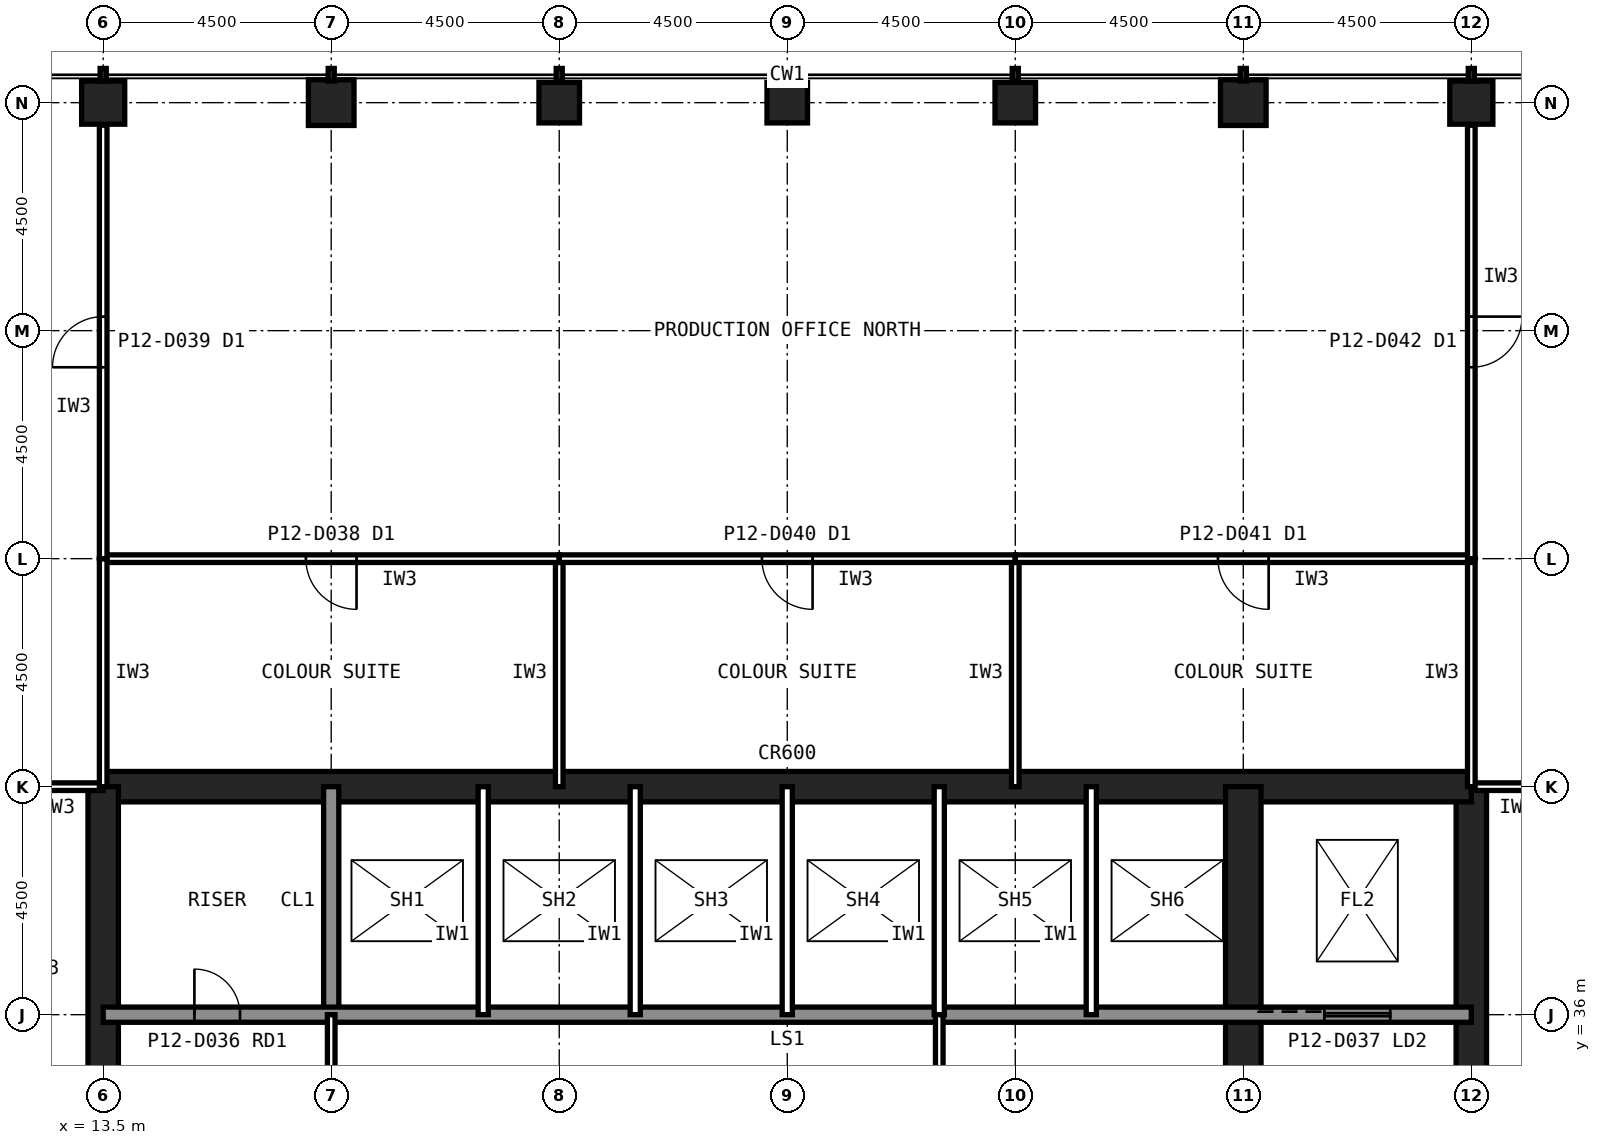
"""IFC4 building model, lengths in metres.
Left out: names, types, materials, properties, quantities, classifications, styles, units other than length and angle.
Written with IfcOpenShell. Run it as: python <this file> out.ifc"""

import sys

from ifc_helpers import new_model, si_unit, direction, frame, frame_2d, origin, origin_2d, place, context, subcontext, project, spatial, rectangle, hollow_rectangle, extrude, element, fill, save


model = new_model("IFC4")
c1 = context("Model", 3, precision=1e-05, world=origin(), true_north=direction((0.0, 1.0)))
c2 = subcontext(c1, "Body", "Model", "MODEL_VIEW")
j1 = project(units=[si_unit("LENGTHUNIT", "METRE"), si_unit("PLANEANGLEUNIT", "RADIAN")], contexts=[c1])
p1 = place(None, origin())
s1 = spatial("IfcSite", under=j1, at=p1, CompositionType="ELEMENT")
p2 = place(p1, origin())
s2 = spatial("IfcBuilding", under=s1, at=p2, CompositionType="ELEMENT")
p3 = place(p2, frame((0.0, 0.0, 54.2)))
s3 = spatial("IfcBuildingStorey", under=s2, at=p3, CompositionType="ELEMENT", Elevation=54.2)
p4 = place(p3, frame((40.5, 54.0, 0.0), z_axis=(0.0, 0.0, 1.0), x_axis=(1.0, 0.0, 0.0)))
e1 = element("IfcColumn", 1, at=p4, inside=s3, PredefinedType="COLUMN", context=c2, shape_type="SweptSolid", body=[
    extrude(hollow_rectangle(XDim=0.85, YDim=0.85, WallThickness=0.05, at=origin_2d()), origin(), (0.0, 0.0, 1.0), 4.2),
])
p5 = place(p3, frame((36.0, 54.0, 0.0), z_axis=(0.0, 0.0, 1.0), x_axis=(1.0, 0.0, 0.0)))
e2 = element("IfcColumn", 2, at=p5, inside=s3, PredefinedType="COLUMN", context=c2, shape_type="SweptSolid", body=[
    extrude(hollow_rectangle(XDim=0.9, YDim=0.9, WallThickness=0.063, at=origin_2d()), origin(), (0.0, 0.0, 1.0), 4.2),
])
for number, where, z_axis, x_axis in (
    (3, (31.5, 54.0, 0.0), (0.0, 0.0, 1.0), (1.0, 0.0, 0.0)),
    (4, (27.0, 54.0, 0.0), (0.0, 0.0, 1.0), (1.0, 0.0, 0.0)),
    (5, (22.5, 54.0, 0.0), (0.0, 0.0, 1.0), (1.0, 0.0, 0.0)),
):
    element("IfcColumn", number, at=place(p3, frame(where, z_axis=z_axis, x_axis=x_axis)), inside=s3, PredefinedType="COLUMN", context=c2, shape_type="SweptSolid", body=[
        extrude(hollow_rectangle(XDim=0.8, YDim=0.8, WallThickness=0.045, at=origin_2d()), origin(), (0.0, 0.0, 1.0), 4.2),
    ])
p6 = place(p3, frame((18.0, 54.0, 0.0), z_axis=(0.0, 0.0, 1.0), x_axis=(1.0, 0.0, 0.0)))
e6 = element("IfcColumn", 6, at=p6, inside=s3, PredefinedType="COLUMN", context=c2, shape_type="SweptSolid", body=[
    extrude(hollow_rectangle(XDim=0.9, YDim=0.9, WallThickness=0.063, at=origin_2d()), origin(), (0.0, 0.0, 1.0), 4.2),
])
p7 = place(p3, frame((13.5, 54.0, 0.0), z_axis=(0.0, 0.0, 1.0), x_axis=(1.0, 0.0, 0.0)))
e7 = element("IfcColumn", 7, at=p7, inside=s3, PredefinedType="COLUMN", context=c2, shape_type="SweptSolid", body=[
    extrude(hollow_rectangle(XDim=0.85, YDim=0.85, WallThickness=0.05, at=origin_2d()), origin(), (0.0, 0.0, 1.0), 4.2),
])
p8 = place(p3, frame((40.5, 13.5, 0.0), z_axis=(0.0, 0.0, 1.0), x_axis=(0.0, 1.0, 0.0)))
e8 = element("IfcWall", 8, at=p8, inside=s3, PredefinedType="SHEAR", context=c2, shape_type="SweptSolid", body=[
    extrude(rectangle(XDim=27.0, YDim=0.6, at=frame_2d((13.5, 0.0))), origin(), (0.0, 0.0, 1.0), 4.2),
])
p9 = place(p8, frame((5.85, 0.0, 0.0)))
e9 = element("IfcOpeningElement", 9, at=p9, cuts=e8, PredefinedType="OPENING", context=c2, shape_type="SweptSolid", body=[
    extrude(rectangle(XDim=1.8, YDim=2.1, at=frame_2d((0.9, 1.05))), frame((0.0, 0.31, 0.0), z_axis=(0.0, -1.0, 0.0), x_axis=(1.0, 0.0, 0.0)), (0.0, 0.0, 1.0), 0.62),
])
p10 = place(p8, frame((19.65, 0.0, 0.0)))
e10 = element("IfcOpeningElement", 10, at=p10, cuts=e8, PredefinedType="OPENING", context=c2, shape_type="SweptSolid", body=[
    extrude(rectangle(XDim=1.2, YDim=2.1, at=frame_2d((0.6, 1.05))), frame((0.0, 0.31, 0.0), z_axis=(0.0, -1.0, 0.0), x_axis=(1.0, 0.0, 0.0)), (0.0, 0.0, 1.0), 0.62),
])
p11 = place(p3, frame((40.5, 40.5, 0.0), z_axis=(0.0, 0.0, 1.0), x_axis=(-1.0, 0.0, 0.0)))
e11 = element("IfcWall", 11, at=p11, inside=s3, PredefinedType="SHEAR", context=c2, shape_type="SweptSolid", body=[
    extrude(rectangle(XDim=27.0, YDim=0.6, at=frame_2d((13.5, 0.0))), origin(), (0.0, 0.0, 1.0), 4.2),
])
p12 = place(p3, frame((13.5, 40.5, 0.0), z_axis=(0.0, 0.0, 1.0), x_axis=(0.0, -1.0, 0.0)))
e12 = element("IfcWall", 12, at=p12, inside=s3, PredefinedType="SHEAR", context=c2, shape_type="SweptSolid", body=[
    extrude(rectangle(XDim=27.0, YDim=0.6, at=frame_2d((13.5, 0.0))), origin(), (0.0, 0.0, 1.0), 4.2),
])
p13 = place(p12, frame((19.65, 0.0, 0.0)))
e13 = element("IfcOpeningElement", 13, at=p13, cuts=e12, PredefinedType="OPENING", context=c2, shape_type="SweptSolid", body=[
    extrude(rectangle(XDim=1.2, YDim=2.1, at=frame_2d((0.6, 1.05))), frame((0.0, 0.31, 0.0), z_axis=(0.0, -1.0, 0.0), x_axis=(1.0, 0.0, 0.0)), (0.0, 0.0, 1.0), 0.62),
])
p14 = place(p12, frame((5.85, 0.0, 0.0)))
e14 = element("IfcOpeningElement", 14, at=p14, cuts=e12, PredefinedType="OPENING", context=c2, shape_type="SweptSolid", body=[
    extrude(rectangle(XDim=1.8, YDim=2.1, at=frame_2d((0.9, 1.05))), frame((0.0, 0.31, 0.0), z_axis=(0.0, -1.0, 0.0), x_axis=(1.0, 0.0, 0.0)), (0.0, 0.0, 1.0), 0.62),
])
p15 = place(p3, frame((18.0, 36.0, 0.0), z_axis=(0.0, 0.0, 1.0), x_axis=(0.0, 1.0, 0.0)))
e15 = element("IfcWall", 15, at=p15, inside=s3, PredefinedType="SOLIDWALL", context=c2, shape_type="SweptSolid", body=[
    extrude(rectangle(XDim=4.5, YDim=0.3, at=frame_2d((2.25, 0.0))), origin(), (0.0, 0.0, 1.0), 4.04),
])
p16 = place(p3, frame((36.0, 22.5, 0.0), z_axis=(0.0, 0.0, 1.0), x_axis=(0.0, 1.0, 0.0)))
e16 = element("IfcWall", 16, at=p16, inside=s3, PredefinedType="SHEAR", context=c2, shape_type="SweptSolid", body=[
    extrude(rectangle(XDim=18.0, YDim=0.7, at=frame_2d((9.0, 0.0))), origin(), (0.0, 0.0, 1.0), 4.2),
])
p17 = place(p3, frame((13.5, 36.0, 0.0), z_axis=(0.0, 0.0, 1.0), x_axis=(1.0, 0.0, 0.0)))
e17 = element("IfcWall", 17, at=p17, inside=s3, PredefinedType="SOLIDWALL", context=c2, shape_type="SweptSolid", body=[
    extrude(rectangle(XDim=27.0, YDim=0.3, at=frame_2d((13.5, 0.0))), origin(), (0.0, 0.0, 1.0), 4.04),
])
p18 = place(p17, frame((1.8, 0.0, 0.0)))
e18 = element("IfcOpeningElement", 18, at=p18, cuts=e17, PredefinedType="OPENING", context=c2, shape_type="SweptSolid", body=[
    extrude(rectangle(XDim=0.9, YDim=2.1, at=frame_2d((0.45, 1.05))), frame((0.0, 0.16, 0.0), z_axis=(0.0, -1.0, 0.0), x_axis=(1.0, 0.0, 0.0)), (0.0, 0.0, 1.0), 0.32),
])
p19 = place(p17, frame((24.1, 0.0, 0.0)))
e19 = element("IfcOpeningElement", 19, at=p19, cuts=e17, PredefinedType="OPENING", context=c2, shape_type="SweptSolid", body=[
    extrude(rectangle(XDim=1.3, YDim=2.2, at=frame_2d((0.65, 1.1))), frame((0.0, 0.16, 0.0), z_axis=(0.0, -1.0, 0.0), x_axis=(1.0, 0.0, 0.0)), (0.0, 0.0, 1.0), 0.32),
])
for number, where, z_axis, x_axis in (
    (20, (21.0, 36.0, 0.0), (0.0, 0.0, 1.0), (0.0, 1.0, 0.0)),
    (21, (24.0, 36.0, 0.0), (0.0, 0.0, 1.0), (0.0, 1.0, 0.0)),
    (22, (27.0, 36.0, 0.0), (0.0, 0.0, 1.0), (0.0, 1.0, 0.0)),
    (23, (30.0, 36.0, 0.0), (0.0, 0.0, 1.0), (0.0, 1.0, 0.0)),
    (24, (33.0, 36.0, 0.0), (0.0, 0.0, 1.0), (0.0, 1.0, 0.0)),
):
    element("IfcWall", number, at=place(p3, frame(where, z_axis=z_axis, x_axis=x_axis)), inside=s3, PredefinedType="PARTITIONING", context=c2, shape_type="SweptSolid", body=[
        extrude(rectangle(XDim=4.5, YDim=0.2, at=frame_2d((2.25, 0.0))), origin(), (0.0, 0.0, 1.0), 4.04),
    ])
for number, where, z_axis, x_axis in (
    (25, (18.0, 33.3, 0.0), (0.0, 0.0, 1.0), (0.0, 1.0, 0.0)),
    (26, (30.0, 33.3, 0.0), (0.0, 0.0, 1.0), (0.0, 1.0, 0.0)),
):
    element("IfcWall", number, at=place(p3, frame(where, z_axis=z_axis, x_axis=x_axis)), inside=s3, PredefinedType="PARTITIONING", context=c2, shape_type="SweptSolid", body=[
        extrude(rectangle(XDim=2.7, YDim=0.15, at=frame_2d((1.35, 0.0))), origin(), (0.0, 0.0, 1.0), 4.04),
    ])
for number, where, z_axis, x_axis in (
    (27, (13.5, 40.5, 0.0), (0.0, 0.0, 1.0), (-1.0, 0.0, 0.0)),
    (28, (42.3, 40.5, 0.0), (0.0, 0.0, 1.0), (-1.0, 0.0, 0.0)),
):
    element("IfcWall", number, at=place(p3, frame(where, z_axis=z_axis, x_axis=x_axis)), inside=s3, PredefinedType="PARTITIONING", context=c2, shape_type="SweptSolid", body=[
        extrude(rectangle(XDim=1.8, YDim=0.15, at=frame_2d((0.9, 0.0))), origin(), (0.0, 0.0, 1.0), 3.189),
    ])
p20 = place(p3, frame((22.5, 40.5, 0.0), z_axis=(0.0, 0.0, 1.0), x_axis=(0.0, 1.0, 0.0)))
e29 = element("IfcWall", 29, at=p20, inside=s3, PredefinedType="PARTITIONING", context=c2, shape_type="SweptSolid", body=[
    extrude(rectangle(XDim=4.5, YDim=0.15, at=frame_2d((2.25, 0.0))), origin(), (0.0, 0.0, 1.0), 3.189),
])
p21 = place(p3, frame((22.5, 45.0, 0.0), z_axis=(0.0, 0.0, 1.0), x_axis=(-1.0, 0.0, 0.0)))
e30 = element("IfcWall", 30, at=p21, inside=s3, PredefinedType="PARTITIONING", context=c2, shape_type="SweptSolid", body=[
    extrude(rectangle(XDim=9.0, YDim=0.15, at=frame_2d((4.5, 0.0))), origin(), (0.0, 0.0, 1.0), 4.04),
])
p22 = place(p21, frame((4.0, 0.0, 0.0)))
e31 = element("IfcOpeningElement", 31, at=p22, cuts=e30, PredefinedType="OPENING", context=c2, shape_type="SweptSolid", body=[
    extrude(rectangle(XDim=1.0, YDim=2.1, at=frame_2d((0.5, 1.05))), frame((0.0, 0.085, 0.0), z_axis=(0.0, -1.0, 0.0), x_axis=(1.0, 0.0, 0.0)), (0.0, 0.0, 1.0), 0.17),
])
for number, where, z_axis, x_axis in (
    (32, (13.5, 45.0, 0.0), (0.0, 0.0, 1.0), (0.0, -1.0, 0.0)),
    (33, (31.5, 40.5, 0.0), (0.0, 0.0, 1.0), (0.0, 1.0, 0.0)),
):
    element("IfcWall", number, at=place(p3, frame(where, z_axis=z_axis, x_axis=x_axis)), inside=s3, PredefinedType="PARTITIONING", context=c2, shape_type="SweptSolid", body=[
        extrude(rectangle(XDim=4.5, YDim=0.15, at=frame_2d((2.25, 0.0))), origin(), (0.0, 0.0, 1.0), 3.189),
    ])
p23 = place(p3, frame((31.5, 45.0, 0.0), z_axis=(0.0, 0.0, 1.0), x_axis=(-1.0, 0.0, 0.0)))
e34 = element("IfcWall", 34, at=p23, inside=s3, PredefinedType="PARTITIONING", context=c2, shape_type="SweptSolid", body=[
    extrude(rectangle(XDim=9.0, YDim=0.15, at=frame_2d((4.5, 0.0))), origin(), (0.0, 0.0, 1.0), 4.04),
])
p24 = place(p23, frame((4.0, 0.0, 0.0)))
e35 = element("IfcOpeningElement", 35, at=p24, cuts=e34, PredefinedType="OPENING", context=c2, shape_type="SweptSolid", body=[
    extrude(rectangle(XDim=1.0, YDim=2.1, at=frame_2d((0.5, 1.05))), frame((0.0, 0.085, 0.0), z_axis=(0.0, -1.0, 0.0), x_axis=(1.0, 0.0, 0.0)), (0.0, 0.0, 1.0), 0.17),
])
p25 = place(p3, frame((40.5, 40.5, 0.0), z_axis=(0.0, 0.0, 1.0), x_axis=(0.0, 1.0, 0.0)))
e36 = element("IfcWall", 36, at=p25, inside=s3, PredefinedType="PARTITIONING", context=c2, shape_type="SweptSolid", body=[
    extrude(rectangle(XDim=4.5, YDim=0.15, at=frame_2d((2.25, 0.0))), origin(), (0.0, 0.0, 1.0), 3.189),
])
p26 = place(p3, frame((40.5, 45.0, 0.0), z_axis=(0.0, 0.0, 1.0), x_axis=(-1.0, 0.0, 0.0)))
e37 = element("IfcWall", 37, at=p26, inside=s3, PredefinedType="PARTITIONING", context=c2, shape_type="SweptSolid", body=[
    extrude(rectangle(XDim=9.0, YDim=0.15, at=frame_2d((4.5, 0.0))), origin(), (0.0, 0.0, 1.0), 4.04),
])
p27 = place(p26, frame((4.0, 0.0, 0.0)))
e38 = element("IfcOpeningElement", 38, at=p27, cuts=e37, PredefinedType="OPENING", context=c2, shape_type="SweptSolid", body=[
    extrude(rectangle(XDim=1.0, YDim=2.1, at=frame_2d((0.5, 1.05))), frame((0.0, 0.085, 0.0), z_axis=(0.0, -1.0, 0.0), x_axis=(1.0, 0.0, 0.0)), (0.0, 0.0, 1.0), 0.17),
])
p28 = place(p3, frame((40.5, 53.555, 0.0), z_axis=(0.0, 0.0, 1.0), x_axis=(0.0, -1.0, 0.0)))
e39 = element("IfcWall", 39, at=p28, inside=s3, PredefinedType="PARTITIONING", context=c2, shape_type="SweptSolid", body=[
    extrude(rectangle(XDim=8.555, YDim=0.15, at=frame_2d((4.277, 0.0))), origin(), (0.0, 0.0, 1.0), 3.189),
])
p29 = place(p28, frame((3.778, 0.0, 0.0)))
e40 = element("IfcOpeningElement", 40, at=p29, cuts=e39, PredefinedType="OPENING", context=c2, shape_type="SweptSolid", body=[
    extrude(rectangle(XDim=1.0, YDim=2.1, at=frame_2d((0.5, 1.05))), frame((0.0, 0.085, 0.0), z_axis=(0.0, -1.0, 0.0), x_axis=(1.0, 0.0, 0.0)), (0.0, 0.0, 1.0), 0.17),
])
p30 = place(p3, frame((13.5, 45.0, 0.0), z_axis=(0.0, 0.0, 1.0), x_axis=(0.0, 1.0, 0.0)))
e41 = element("IfcWall", 41, at=p30, inside=s3, PredefinedType="PARTITIONING", context=c2, shape_type="SweptSolid", body=[
    extrude(rectangle(XDim=8.555, YDim=0.15, at=frame_2d((4.277, 0.0))), origin(), (0.0, 0.0, 1.0), 3.189),
])
p31 = place(p30, frame((3.778, 0.0, 0.0)))
e42 = element("IfcOpeningElement", 42, at=p31, cuts=e41, PredefinedType="OPENING", context=c2, shape_type="SweptSolid", body=[
    extrude(rectangle(XDim=1.0, YDim=2.1, at=frame_2d((0.5, 1.05))), frame((0.0, 0.085, 0.0), z_axis=(0.0, -1.0, 0.0), x_axis=(1.0, 0.0, 0.0)), (0.0, 0.0, 1.0), 0.17),
])
p32 = place(p18, origin())
e43 = element("IfcDoor", 43, at=p32, inside=s3, OperationType="SINGLE_SWING_LEFT", PredefinedType="DOOR", context=c2, shape_type="SweptSolid", body=[
    extrude(rectangle(XDim=0.9, YDim=2.1, at=frame_2d((0.45, 1.05))), frame((0.0, 0.025, 0.0), z_axis=(0.0, -1.0, 0.0), x_axis=(1.0, 0.0, 0.0)), (0.0, 0.0, 1.0), 0.05),
])
fill(e18, e43)
p33 = place(p19, origin())
e44 = element("IfcDoor", 44, at=p33, inside=s3, OperationType="SLIDING_TO_LEFT", PredefinedType="DOOR", context=c2, shape_type="SweptSolid", body=[
    extrude(rectangle(XDim=1.3, YDim=2.2, at=frame_2d((0.65, 1.1))), frame((0.0, 0.025, 0.0), z_axis=(0.0, -1.0, 0.0), x_axis=(1.0, 0.0, 0.0)), (0.0, 0.0, 1.0), 0.05),
])
fill(e19, e44)
p34 = place(p22, origin())
e45 = element("IfcDoor", 45, at=p34, inside=s3, OperationType="SINGLE_SWING_LEFT", PredefinedType="DOOR", context=c2, shape_type="SweptSolid", body=[
    extrude(rectangle(XDim=1.0, YDim=2.1, at=frame_2d((0.5, 1.05))), frame((0.0, 0.025, 0.0), z_axis=(0.0, -1.0, 0.0), x_axis=(1.0, 0.0, 0.0)), (0.0, 0.0, 1.0), 0.05),
])
fill(e31, e45)
p35 = place(p24, origin())
e46 = element("IfcDoor", 46, at=p35, inside=s3, OperationType="SINGLE_SWING_LEFT", PredefinedType="DOOR", context=c2, shape_type="SweptSolid", body=[
    extrude(rectangle(XDim=1.0, YDim=2.1, at=frame_2d((0.5, 1.05))), frame((0.0, 0.025, 0.0), z_axis=(0.0, -1.0, 0.0), x_axis=(1.0, 0.0, 0.0)), (0.0, 0.0, 1.0), 0.05),
])
fill(e35, e46)
p36 = place(p27, origin())
e47 = element("IfcDoor", 47, at=p36, inside=s3, OperationType="SINGLE_SWING_LEFT", PredefinedType="DOOR", context=c2, shape_type="SweptSolid", body=[
    extrude(rectangle(XDim=1.0, YDim=2.1, at=frame_2d((0.5, 1.05))), frame((0.0, 0.025, 0.0), z_axis=(0.0, -1.0, 0.0), x_axis=(1.0, 0.0, 0.0)), (0.0, 0.0, 1.0), 0.05),
])
fill(e38, e47)
p37 = place(p29, origin())
e48 = element("IfcDoor", 48, at=p37, inside=s3, OperationType="SINGLE_SWING_LEFT", PredefinedType="DOOR", context=c2, shape_type="SweptSolid", body=[
    extrude(rectangle(XDim=1.0, YDim=2.1, at=frame_2d((0.5, 1.05))), frame((0.0, 0.025, 0.0), z_axis=(0.0, -1.0, 0.0), x_axis=(1.0, 0.0, 0.0)), (0.0, 0.0, 1.0), 0.05),
])
fill(e40, e48)
p38 = place(p31, origin())
e49 = element("IfcDoor", 49, at=p38, inside=s3, OperationType="SINGLE_SWING_LEFT", PredefinedType="DOOR", context=c2, shape_type="SweptSolid", body=[
    extrude(rectangle(XDim=1.0, YDim=2.1, at=frame_2d((0.5, 1.05))), frame((0.0, 0.025, 0.0), z_axis=(0.0, -1.0, 0.0), x_axis=(1.0, 0.0, 0.0)), (0.0, 0.0, 1.0), 0.05),
])
fill(e42, e49)
save(model, sys.argv[1])
